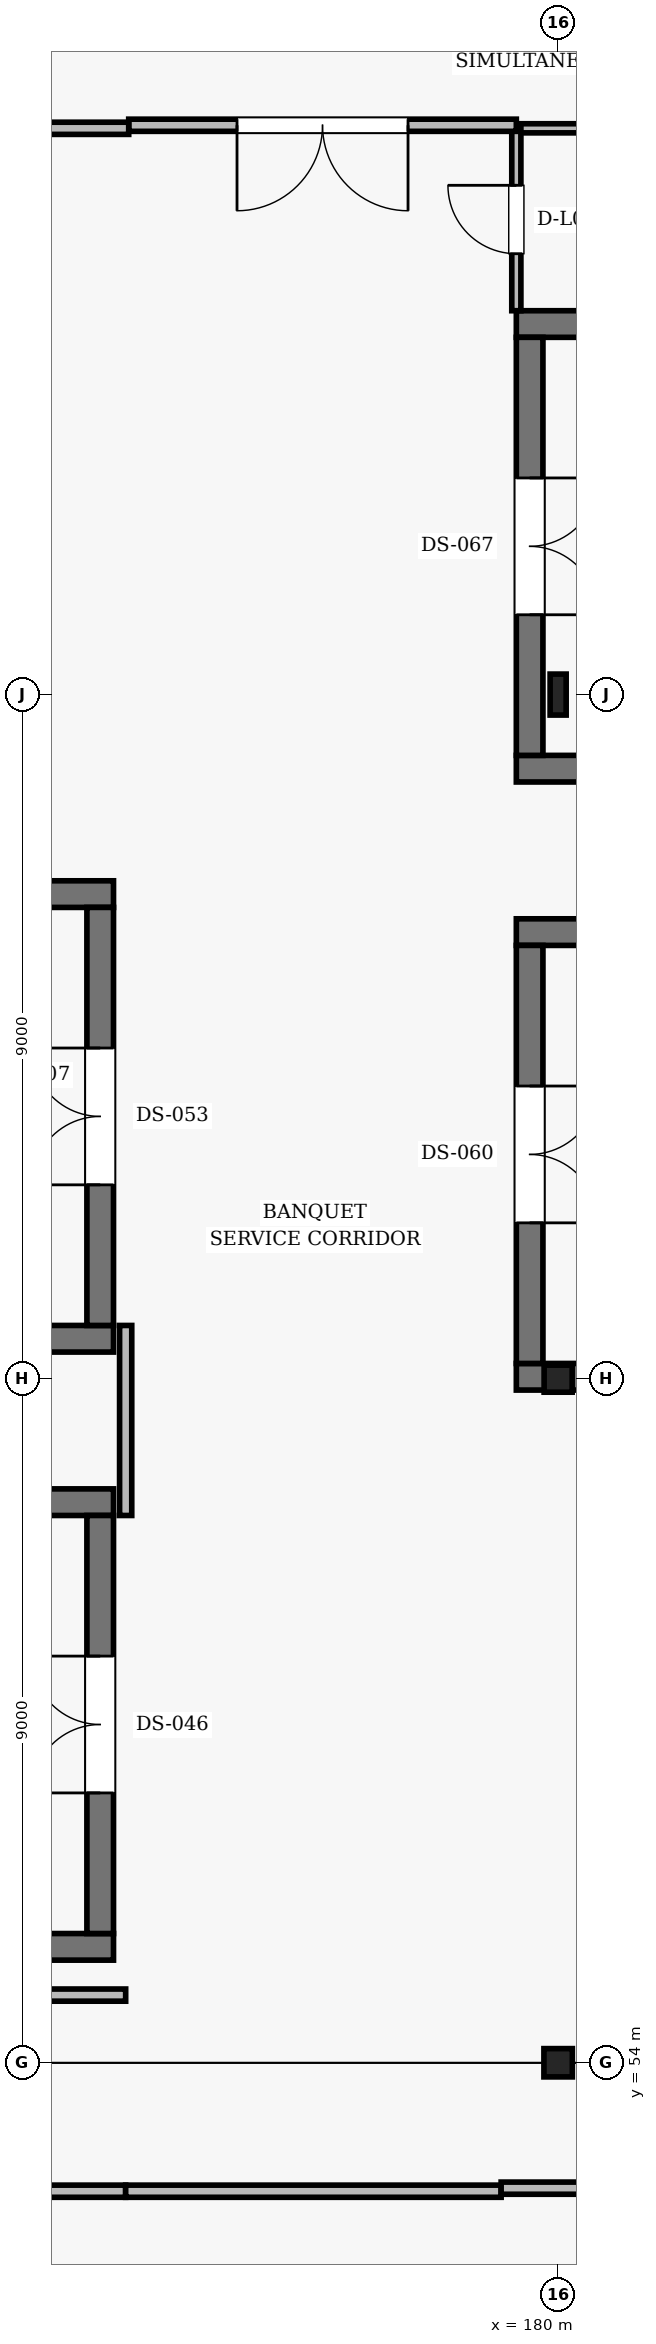
"""IFC4 building model, lengths in metres.
Left out: names, types, materials, properties, quantities, classifications, styles, units other than length and angle.
Written with IfcOpenShell. Run it as: python <this file> out.ifc"""

import sys

from ifc_helpers import new_model, si_unit, direction, frame, frame_2d, origin, origin_2d, place, context, subcontext, project, spatial, rectangle, i_section, extrude, element, fill, save


model = new_model("IFC4")
c1 = context("Model", 3, precision=1e-05, world=origin(), true_north=direction((0.0, 1.0)))
c2 = subcontext(c1, "Body", "Model", "MODEL_VIEW")
j1 = project(units=[si_unit("LENGTHUNIT", "METRE"), si_unit("PLANEANGLEUNIT", "RADIAN")], contexts=[c1])
p1 = place(None, origin())
s1 = spatial("IfcSite", under=j1, at=p1, CompositionType="ELEMENT")
p2 = place(p1, origin())
s2 = spatial("IfcBuilding", under=s1, at=p2, CompositionType="ELEMENT")
p3 = place(p2, frame((0.0, 0.0, 10.8)))
s3 = spatial("IfcBuildingStorey", under=s2, at=p3, CompositionType="ELEMENT", Elevation=10.8)
p4 = place(p3, frame((180.0, 54.0, 0.0), z_axis=(0.0, 0.0, 1.0), x_axis=(1.0, 0.0, 0.0)))
e1 = element("IfcColumn", 1, at=p4, inside=s3, PredefinedType="COLUMN", context=c2, shape_type="SweptSolid", body=[
    extrude(i_section(OverallWidth=0.374, OverallDepth=0.372, WebThickness=0.016, FlangeThickness=0.026, FilletRadius=0.016, at=origin_2d()), origin(), (0.0, 0.0, 1.0), 4.8),
])
p5 = place(p3, frame((180.0, 63.0, 0.0), z_axis=(0.0, 0.0, 1.0), x_axis=(1.0, 0.0, 0.0)))
e2 = element("IfcColumn", 2, at=p5, inside=s3, PredefinedType="COLUMN", context=c2, shape_type="SweptSolid", body=[
    extrude(i_section(OverallWidth=0.369, OverallDepth=0.356, WebThickness=0.011, FlangeThickness=0.018, FilletRadius=0.015, at=origin_2d()), origin(), (0.0, 0.0, 1.0), 4.8),
])
p6 = place(p3, frame((180.0, 72.0, 0.0), z_axis=(0.0, 0.0, 1.0), x_axis=(1.0, 0.0, 0.0)))
e3 = element("IfcColumn", 3, at=p6, inside=s3, PredefinedType="COLUMN", context=c2, shape_type="SweptSolid", body=[
    extrude(i_section(OverallWidth=0.211, OverallDepth=0.539, WebThickness=0.012, FlangeThickness=0.019, FilletRadius=0.014, at=origin_2d()), origin(), (0.0, 0.0, 1.0), 4.8),
])
for number, where, z_axis, x_axis in (
    (4, (162.05, 55.525, 0.0), (0.0, 0.0, 1.0), (1.0, 0.0, 0.0)),
    (5, (174.15, 61.375, 0.0), (0.0, 0.0, 1.0), (-1.0, 0.0, 0.0)),
):
    element("IfcWall", number, at=place(p3, frame(where, z_axis=z_axis, x_axis=x_axis)), inside=s3, PredefinedType="SHEAR", context=c2, shape_type="SweptSolid", body=[
        extrude(rectangle(XDim=12.1, YDim=0.35, at=frame_2d((6.05, 0.0))), origin(), (0.0, 0.0, 1.0), 4.6),
    ])
p7 = place(p3, frame((173.975, 55.7, 0.0), z_axis=(0.0, 0.0, 1.0), x_axis=(0.0, 1.0, 0.0)))
e6 = element("IfcWall", 6, at=p7, inside=s3, PredefinedType="SHEAR", context=c2, shape_type="SweptSolid", body=[
    extrude(rectangle(XDim=5.5, YDim=0.35, at=frame_2d((2.75, 0.0))), origin(), (0.0, 0.0, 1.0), 4.6),
])
p8 = place(p7, frame((1.85, 0.0, 0.0)))
e7 = element("IfcOpeningElement", 7, at=p8, cuts=e6, PredefinedType="OPENING", context=c2, shape_type="SweptSolid", body=[
    extrude(rectangle(XDim=1.8, YDim=2.2, at=frame_2d((0.9, 1.1))), frame((0.0, 0.185, 0.0), z_axis=(0.0, -1.0, 0.0), x_axis=(1.0, 0.0, 0.0)), (0.0, 0.0, 1.0), 0.37),
])
for number, where, z_axis, x_axis in (
    (8, (162.05, 63.525, 0.0), (0.0, 0.0, 1.0), (1.0, 0.0, 0.0)),
    (9, (174.15, 69.375, 0.0), (0.0, 0.0, 1.0), (-1.0, 0.0, 0.0)),
):
    element("IfcWall", number, at=place(p3, frame(where, z_axis=z_axis, x_axis=x_axis)), inside=s3, PredefinedType="SHEAR", context=c2, shape_type="SweptSolid", body=[
        extrude(rectangle(XDim=12.1, YDim=0.35, at=frame_2d((6.05, 0.0))), origin(), (0.0, 0.0, 1.0), 4.6),
    ])
p9 = place(p3, frame((173.975, 63.7, 0.0), z_axis=(0.0, 0.0, 1.0), x_axis=(0.0, 1.0, 0.0)))
e10 = element("IfcWall", 10, at=p9, inside=s3, PredefinedType="SHEAR", context=c2, shape_type="SweptSolid", body=[
    extrude(rectangle(XDim=5.5, YDim=0.35, at=frame_2d((2.75, 0.0))), origin(), (0.0, 0.0, 1.0), 4.6),
])
p10 = place(p9, frame((1.85, 0.0, 0.0)))
e11 = element("IfcOpeningElement", 11, at=p10, cuts=e10, PredefinedType="OPENING", context=c2, shape_type="SweptSolid", body=[
    extrude(rectangle(XDim=1.8, YDim=2.2, at=frame_2d((0.9, 1.1))), frame((0.0, 0.185, 0.0), z_axis=(0.0, -1.0, 0.0), x_axis=(1.0, 0.0, 0.0)), (0.0, 0.0, 1.0), 0.37),
])
p11 = place(p3, frame((179.45, 63.025, 0.0), z_axis=(0.0, 0.0, 1.0), x_axis=(1.0, 0.0, 0.0)))
e12 = element("IfcWall", 12, at=p11, inside=s3, PredefinedType="SHEAR", context=c2, shape_type="SweptSolid", body=[
    extrude(rectangle(XDim=12.373, YDim=0.35, at=frame_2d((6.186, 0.0))), origin(), (0.0, 0.0, 1.0), 4.6),
])
p12 = place(p3, frame((191.55, 68.875, 0.0), z_axis=(0.0, 0.0, 1.0), x_axis=(-1.0, 0.0, 0.0)))
e13 = element("IfcWall", 13, at=p12, inside=s3, PredefinedType="SHEAR", context=c2, shape_type="SweptSolid", body=[
    extrude(rectangle(XDim=12.1, YDim=0.35, at=frame_2d((6.05, 0.0))), origin(), (0.0, 0.0, 1.0), 4.6),
])
p13 = place(p3, frame((179.625, 68.7, 0.0), z_axis=(0.0, 0.0, 1.0), x_axis=(0.0, -1.0, 0.0)))
e14 = element("IfcWall", 14, at=p13, inside=s3, PredefinedType="SHEAR", context=c2, shape_type="SweptSolid", body=[
    extrude(rectangle(XDim=5.5, YDim=0.35, at=frame_2d((2.75, 0.0))), origin(), (0.0, 0.0, 1.0), 4.6),
])
p14 = place(p13, frame((1.85, 0.0, 0.0)))
e15 = element("IfcOpeningElement", 15, at=p14, cuts=e14, PredefinedType="OPENING", context=c2, shape_type="SweptSolid", body=[
    extrude(rectangle(XDim=1.8, YDim=2.2, at=frame_2d((0.9, 1.1))), frame((0.0, 0.185, 0.0), z_axis=(0.0, -1.0, 0.0), x_axis=(1.0, 0.0, 0.0)), (0.0, 0.0, 1.0), 0.37),
])
for number, where, z_axis, x_axis in (
    (16, (179.45, 71.025, 0.0), (0.0, 0.0, 1.0), (1.0, 0.0, 0.0)),
    (17, (191.55, 76.875, 0.0), (0.0, 0.0, 1.0), (-1.0, 0.0, 0.0)),
):
    element("IfcWall", number, at=place(p3, frame(where, z_axis=z_axis, x_axis=x_axis)), inside=s3, PredefinedType="SHEAR", context=c2, shape_type="SweptSolid", body=[
        extrude(rectangle(XDim=12.1, YDim=0.35, at=frame_2d((6.05, 0.0))), origin(), (0.0, 0.0, 1.0), 4.6),
    ])
p15 = place(p3, frame((179.625, 76.7, 0.0), z_axis=(0.0, 0.0, 1.0), x_axis=(0.0, -1.0, 0.0)))
e18 = element("IfcWall", 18, at=p15, inside=s3, PredefinedType="SHEAR", context=c2, shape_type="SweptSolid", body=[
    extrude(rectangle(XDim=5.5, YDim=0.35, at=frame_2d((2.75, 0.0))), origin(), (0.0, 0.0, 1.0), 4.6),
])
p16 = place(p15, frame((1.85, 0.0, 0.0)))
e19 = element("IfcOpeningElement", 19, at=p16, cuts=e18, PredefinedType="OPENING", context=c2, shape_type="SweptSolid", body=[
    extrude(rectangle(XDim=1.8, YDim=2.2, at=frame_2d((0.9, 1.1))), frame((0.0, 0.185, 0.0), z_axis=(0.0, -1.0, 0.0), x_axis=(1.0, 0.0, 0.0)), (0.0, 0.0, 1.0), 0.37),
])
p17 = place(p3, frame((179.45, 79.45, 0.0), z_axis=(0.0, 0.0, 1.0), x_axis=(1.0, 0.0, 0.0)))
e20 = element("IfcWall", 20, at=p17, inside=s3, PredefinedType="PARTITIONING", context=c2, shape_type="SweptSolid", body=[
    extrude(rectangle(XDim=3.0, YDim=0.12, at=frame_2d((1.5, 0.0))), origin(), (0.0, 0.0, 1.0), 3.89),
])
p18 = place(p3, frame((179.45, 77.05, 0.0), z_axis=(0.0, 0.0, 1.0), x_axis=(0.0, 1.0, 0.0)))
e21 = element("IfcWall", 21, at=p18, inside=s3, PredefinedType="PARTITIONING", context=c2, shape_type="SweptSolid", body=[
    extrude(rectangle(XDim=2.4, YDim=0.12, at=frame_2d((1.2, 0.0))), origin(), (0.0, 0.0, 1.0), 4.178),
])
p19 = place(p18, frame((0.75, 0.0, 0.0)))
e22 = element("IfcOpeningElement", 22, at=p19, cuts=e21, PredefinedType="OPENING", context=c2, shape_type="SweptSolid", body=[
    extrude(rectangle(XDim=0.9, YDim=2.1, at=frame_2d((0.45, 1.05))), frame((0.0, 0.07, 0.0), z_axis=(0.0, -1.0, 0.0), x_axis=(1.0, 0.0, 0.0)), (0.0, 0.0, 1.0), 0.14),
])
p20 = place(p3, frame((153.24, 52.31, 0.0), z_axis=(0.0, 0.0, 1.0), x_axis=(1.0, 0.0, 0.0)))
e23 = element("IfcWall", 23, at=p20, inside=s3, PredefinedType="PARTITIONING", context=c2, shape_type="SweptSolid", body=[
    extrude(rectangle(XDim=21.07, YDim=0.16, at=frame_2d((10.535, 0.0))), origin(), (0.0, 0.0, 1.0), 3.73),
])
p21 = place(p20, frame((9.41, 0.0, 0.0)))
e24 = element("IfcOpeningElement", 24, at=p21, cuts=e23, PredefinedType="OPENING", context=c2, shape_type="SweptSolid", body=[
    extrude(rectangle(XDim=2.25, YDim=2.4, at=frame_2d((1.125, 1.2))), frame((0.0, 0.09, 0.0), z_axis=(0.0, -1.0, 0.0), x_axis=(1.0, 0.0, 0.0)), (0.0, 0.0, 1.0), 0.18),
])
p22 = place(p3, frame((174.31, 52.31, 0.0), z_axis=(0.0, 0.0, 1.0), x_axis=(1.0, 0.0, 0.0)))
e25 = element("IfcWall", 25, at=p22, inside=s3, PredefinedType="PARTITIONING", context=c2, shape_type="SweptSolid", body=[
    extrude(rectangle(XDim=4.94, YDim=0.16, at=frame_2d((2.47, 0.0))), origin(), (0.0, 0.0, 1.0), 4.128),
])
p23 = place(p3, frame((179.25, 52.35, 0.0), z_axis=(0.0, 0.0, 1.0), x_axis=(1.0, 0.0, 0.0)))
e26 = element("IfcWall", 26, at=p23, inside=s3, PredefinedType="PARTITIONING", context=c2, shape_type="SweptSolid", body=[
    extrude(rectangle(XDim=7.55, YDim=0.16, at=frame_2d((3.775, 0.0))), origin(), (0.0, 0.0, 1.0), 3.73),
])
p24 = place(p3, frame((174.31, 63.7, 0.0), z_axis=(0.0, 0.0, 1.0), x_axis=(0.0, -1.0, 0.0)))
e27 = element("IfcWall", 27, at=p24, inside=s3, PredefinedType="PARTITIONING", context=c2, shape_type="SweptSolid", body=[
    extrude(rectangle(XDim=2.5, YDim=0.16, at=frame_2d((1.25, 0.0))), origin(), (0.0, 0.0, 1.0), 3.812),
])
p25 = place(p3, frame((174.31, 54.89, 0.0), z_axis=(0.0, 0.0, 1.0), x_axis=(-1.0, 0.0, 0.0)))
e28 = element("IfcWall", 28, at=p25, inside=s3, PredefinedType="PARTITIONING", context=c2, shape_type="SweptSolid", body=[
    extrude(rectangle(XDim=14.96, YDim=0.16, at=frame_2d((7.48, 0.0))), origin(), (0.0, 0.0, 1.0), 3.974),
])
p26 = place(p3, frame((179.45, 79.49, 0.0), z_axis=(0.0, 0.0, 1.0), x_axis=(-1.0, 0.0, 0.0)))
e29 = element("IfcWall", 29, at=p26, inside=s3, PredefinedType="PARTITIONING", context=c2, shape_type="SweptSolid", body=[
    extrude(rectangle(XDim=5.1, YDim=0.16, at=frame_2d((2.55, 0.0))), origin(), (0.0, 0.0, 1.0), 4.6),
])
p27 = place(p26, frame((1.425, 0.0, 0.0)))
e30 = element("IfcOpeningElement", 30, at=p27, cuts=e29, PredefinedType="OPENING", context=c2, shape_type="SweptSolid", body=[
    extrude(rectangle(XDim=2.25, YDim=2.4, at=frame_2d((1.125, 1.2))), frame((0.0, 0.09, 0.0), z_axis=(0.0, -1.0, 0.0), x_axis=(1.0, 0.0, 0.0)), (0.0, 0.0, 1.0), 0.18),
])
p28 = place(p3, frame((174.35, 79.45, 0.0), z_axis=(0.0, 0.0, 1.0), x_axis=(-1.0, 0.0, 0.0)))
e31 = element("IfcWall", 31, at=p28, inside=s3, PredefinedType="PARTITIONING", context=c2, shape_type="SweptSolid", body=[
    extrude(rectangle(XDim=21.338, YDim=0.16, at=frame_2d((10.669, 0.0))), origin(), (0.0, 0.0, 1.0), 3.89),
])
p29 = place(p8, origin())
e32 = element("IfcDoor", 32, at=p29, inside=s3, OperationType="DOUBLE_DOOR_SINGLE_SWING", PredefinedType="DOOR", context=c2, shape_type="SweptSolid", body=[
    extrude(rectangle(XDim=1.8, YDim=2.2, at=frame_2d((0.9, 1.1))), frame((0.0, 0.025, 0.0), z_axis=(0.0, -1.0, 0.0), x_axis=(1.0, 0.0, 0.0)), (0.0, 0.0, 1.0), 0.05),
])
fill(e7, e32)
p30 = place(p10, origin())
e33 = element("IfcDoor", 33, at=p30, inside=s3, OperationType="DOUBLE_DOOR_SINGLE_SWING", PredefinedType="DOOR", context=c2, shape_type="SweptSolid", body=[
    extrude(rectangle(XDim=1.8, YDim=2.2, at=frame_2d((0.9, 1.1))), frame((0.0, 0.025, 0.0), z_axis=(0.0, -1.0, 0.0), x_axis=(1.0, 0.0, 0.0)), (0.0, 0.0, 1.0), 0.05),
])
fill(e11, e33)
p31 = place(p14, origin())
e34 = element("IfcDoor", 34, at=p31, inside=s3, OperationType="DOUBLE_DOOR_SINGLE_SWING", PredefinedType="DOOR", context=c2, shape_type="SweptSolid", body=[
    extrude(rectangle(XDim=1.8, YDim=2.2, at=frame_2d((0.9, 1.1))), frame((0.0, 0.025, 0.0), z_axis=(0.0, -1.0, 0.0), x_axis=(1.0, 0.0, 0.0)), (0.0, 0.0, 1.0), 0.05),
])
fill(e15, e34)
p32 = place(p16, origin())
e35 = element("IfcDoor", 35, at=p32, inside=s3, OperationType="DOUBLE_DOOR_SINGLE_SWING", PredefinedType="DOOR", context=c2, shape_type="SweptSolid", body=[
    extrude(rectangle(XDim=1.8, YDim=2.2, at=frame_2d((0.9, 1.1))), frame((0.0, 0.025, 0.0), z_axis=(0.0, -1.0, 0.0), x_axis=(1.0, 0.0, 0.0)), (0.0, 0.0, 1.0), 0.05),
])
fill(e19, e35)
p33 = place(p19, origin())
e36 = element("IfcDoor", 36, at=p33, inside=s3, OperationType="SINGLE_SWING_RIGHT", PredefinedType="DOOR", context=c2, shape_type="SweptSolid", body=[
    extrude(rectangle(XDim=0.9, YDim=2.1, at=frame_2d((0.45, 1.05))), frame((0.0, 0.025, 0.0), z_axis=(0.0, -1.0, 0.0), x_axis=(1.0, 0.0, 0.0)), (0.0, 0.0, 1.0), 0.05),
])
fill(e22, e36)
p34 = place(p27, origin())
e37 = element("IfcDoor", 37, at=p34, inside=s3, OperationType="DOUBLE_DOOR_SINGLE_SWING", PredefinedType="DOOR", context=c2, shape_type="SweptSolid", body=[
    extrude(rectangle(XDim=2.25, YDim=2.4, at=frame_2d((1.125, 1.2))), frame((0.0, 0.025, 0.0), z_axis=(0.0, -1.0, 0.0), x_axis=(1.0, 0.0, 0.0)), (0.0, 0.0, 1.0), 0.05),
])
fill(e30, e37)
save(model, sys.argv[1])
